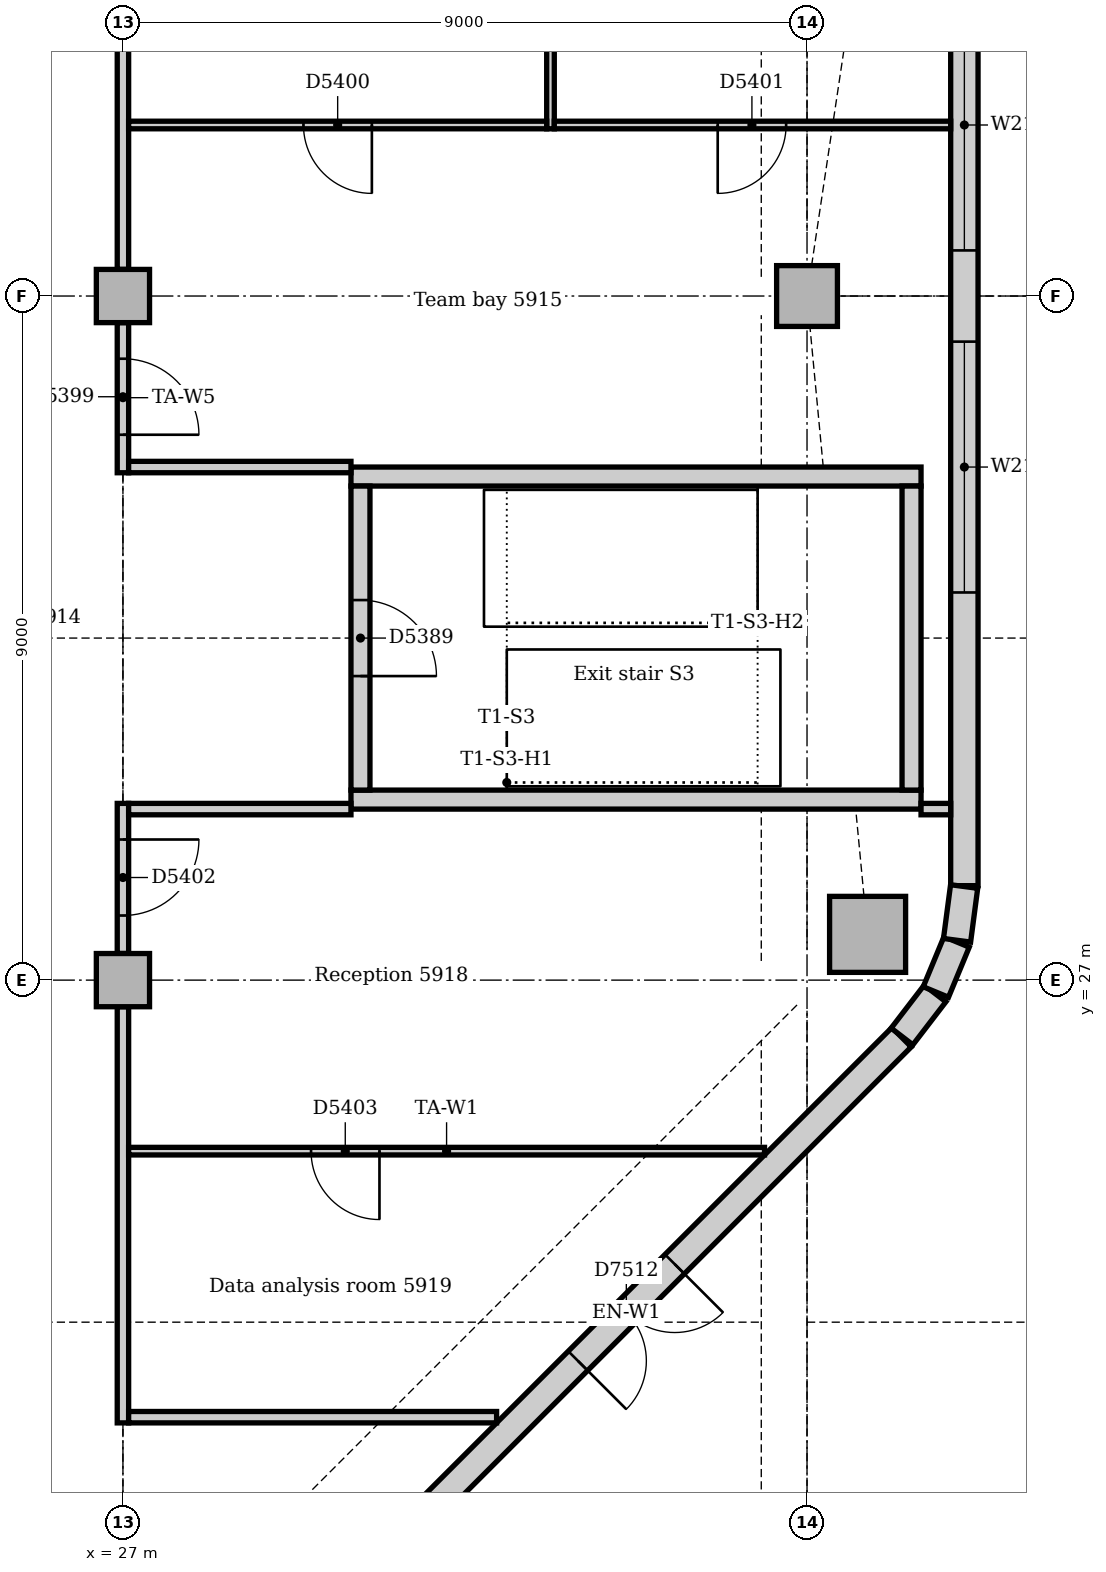
"""IFC4 building model, lengths in metres.
Left out: names, types, materials, properties, quantities, classifications, styles, units other than length and angle.
Written with IfcOpenShell. Run it as: python <this file> out.ifc"""

import sys

from ifc_helpers import new_model, si_unit, direction, frame, frame_2d, origin, origin_2d, place, context, subcontext, project, spatial, rectangle, extrude, element, fill, save


model = new_model("IFC4")
c1 = context("Model", 3, precision=1e-05, world=origin(), true_north=direction((0.0, 1.0)))
c2 = subcontext(c1, "Body", "Model", "MODEL_VIEW")
j1 = project(units=[si_unit("LENGTHUNIT", "METRE"), si_unit("PLANEANGLEUNIT", "RADIAN")], contexts=[c1])
p1 = place(None, origin())
s1 = spatial("IfcSite", under=j1, at=p1, CompositionType="ELEMENT")
p2 = place(p1, origin())
s2 = spatial("IfcBuilding", under=s1, at=p2, CompositionType="ELEMENT")
p3 = place(p2, frame((0.0, 0.0, 247.0)))
s3 = spatial("IfcBuildingStorey", under=s2, at=p3, CompositionType="ELEMENT", Elevation=247.0)
for number, where, z_axis, x_axis in (
    (1, (30.0, 29.375, 0.0), (0.0, 0.0, 1.0), (1.0, 0.0, 0.0)),
    (2, (37.5, 33.625, 0.0), (0.0, 0.0, 1.0), (-1.0, 0.0, 0.0)),
):
    element("IfcWall", number, at=place(p3, frame(where, z_axis=z_axis, x_axis=x_axis)), inside=s3, PredefinedType="SOLIDWALL", context=c2, shape_type="SweptSolid", body=[
        extrude(rectangle(XDim=7.5, YDim=0.25, at=frame_2d((3.75, 0.0))), origin(), (0.0, 0.0, 1.0), 4.0),
    ])
p4 = place(p3, frame((37.375, 29.5, 0.0), z_axis=(0.0, 0.0, 1.0), x_axis=(0.0, 1.0, 0.0)))
e3 = element("IfcWall", 3, at=p4, inside=s3, PredefinedType="SOLIDWALL", context=c2, shape_type="SweptSolid", body=[
    extrude(rectangle(XDim=4.0, YDim=0.25, at=frame_2d((2.0, 0.0))), origin(), (0.0, 0.0, 1.0), 4.0),
])
p5 = place(p3, frame((30.125, 33.5, 0.0), z_axis=(0.0, 0.0, 1.0), x_axis=(0.0, -1.0, 0.0)))
e4 = element("IfcWall", 4, at=p5, inside=s3, PredefinedType="SOLIDWALL", context=c2, shape_type="SweptSolid", body=[
    extrude(rectangle(XDim=4.0, YDim=0.25, at=frame_2d((2.0, 0.0))), origin(), (0.0, 0.0, 1.0), 4.0),
])
p6 = place(p5, frame((1.5, 0.0, 0.0)))
e5 = element("IfcOpeningElement", 5, at=p6, cuts=e4, PredefinedType="OPENING", context=c2, shape_type="SweptSolid", body=[
    extrude(rectangle(XDim=1.0, YDim=2.1, at=frame_2d((0.5, 1.05))), frame((0.0, 0.135, 0.0), z_axis=(0.0, -1.0, 0.0), x_axis=(1.0, 0.0, 0.0)), (0.0, 0.0, 1.0), 0.27),
])
p7 = place(p3, frame((36.797, 27.602, -0.15), z_axis=(0.0, 0.0, 1.0), x_axis=(1.0, 0.0, 0.0)))
e6 = element("IfcColumn", 6, at=p7, inside=s3, PredefinedType="COLUMN", context=c2, shape_type="SweptSolid", body=[
    extrude(rectangle(XDim=1.0, YDim=1.0, at=origin_2d()), origin(), (0.0, 0.0, 1.0), 4.0),
])
p8 = place(p3, frame((36.0, 36.0, -0.15), z_axis=(0.0, 0.0, 1.0), x_axis=(1.0, 0.0, 0.0)))
e7 = element("IfcColumn", 7, at=p8, inside=s3, PredefinedType="COLUMN", context=c2, shape_type="SweptSolid", body=[
    extrude(rectangle(XDim=0.8, YDim=0.8, at=origin_2d()), origin(), (0.0, 0.0, 1.0), 4.0),
])
for number, where, z_axis, x_axis in (
    (8, (27.0, 27.0, 0.0), (0.0, 0.0, 1.0), (1.0, 0.0, 0.0)),
    (9, (27.0, 36.0, 0.0), (0.0, 0.0, 1.0), (1.0, 0.0, 0.0)),
):
    element("IfcColumn", number, at=place(p3, frame(where, z_axis=z_axis, x_axis=x_axis)), inside=s3, PredefinedType="COLUMN", context=c2, shape_type="SweptSolid", body=[
        extrude(rectangle(XDim=0.7, YDim=0.7, at=origin_2d()), origin(), (0.0, 0.0, 1.0), 3.85),
    ])
p9 = place(p3, frame((30.001, 19.006, 0.0), z_axis=(0.0, 0.0, 1.0), x_axis=(0.707106781187, 0.707106781187, 0.0)))
e10 = element("IfcWall", 10, at=p9, inside=s3, PredefinedType="STANDARD", context=c2, shape_type="SweptSolid", body=[
    extrude(rectangle(XDim=10.243, YDim=0.36, at=frame_2d((5.121, 0.0))), origin(), (0.0, 0.0, 1.0), 3.85),
])
p10 = place(p9, frame((4.221, 0.0, 0.0)))
e11 = element("IfcOpeningElement", 11, at=p10, cuts=e10, PredefinedType="OPENING", context=c2, shape_type="SweptSolid", body=[
    extrude(rectangle(XDim=1.8, YDim=2.4, at=frame_2d((0.9, 1.2))), frame((0.0, 0.19, 0.0), z_axis=(0.0, -1.0, 0.0), x_axis=(1.0, 0.0, 0.0)), (0.0, 0.0, 1.0), 0.38),
])
p11 = place(p3, frame((38.07, 28.243, 0.0), z_axis=(0.0, 0.0, 1.0), x_axis=(0.0, 1.0, 0.0)))
e12 = element("IfcWall", 12, at=p11, inside=s3, PredefinedType="STANDARD", context=c2, shape_type="SweptSolid", body=[
    extrude(rectangle(XDim=24.515, YDim=0.36, at=frame_2d((12.257, 0.0))), origin(), (0.0, 0.0, 1.0), 3.85),
])
p12 = place(p11, frame((3.857, 0.0, 0.9)))
e13 = element("IfcOpeningElement", 13, at=p12, cuts=e12, PredefinedType="OPENING", context=c2, shape_type="SweptSolid", body=[
    extrude(rectangle(XDim=3.3, YDim=1.6, at=frame_2d((1.65, 0.8))), frame((0.0, 0.19, 0.0), z_axis=(0.0, -1.0, 0.0), x_axis=(1.0, 0.0, 0.0)), (0.0, 0.0, 1.0), 0.38),
])
p13 = place(p11, frame((8.357, 0.0, 0.9)))
e14 = element("IfcOpeningElement", 14, at=p13, cuts=e12, PredefinedType="OPENING", context=c2, shape_type="SweptSolid", body=[
    extrude(rectangle(XDim=3.3, YDim=1.6, at=frame_2d((1.65, 0.8))), frame((0.0, 0.19, 0.0), z_axis=(0.0, -1.0, 0.0), x_axis=(1.0, 0.0, 0.0)), (0.0, 0.0, 1.0), 0.38),
])
p14 = place(p11, frame((13.607, 0.0, 0.0)))
e15 = element("IfcOpeningElement", 15, at=p14, cuts=e12, PredefinedType="OPENING", context=c2, shape_type="SweptSolid", body=[
    extrude(rectangle(XDim=1.8, YDim=2.4, at=frame_2d((0.9, 1.2))), frame((0.0, 0.19, 0.0), z_axis=(0.0, -1.0, 0.0), x_axis=(1.0, 0.0, 0.0)), (0.0, 0.0, 1.0), 0.38),
])
p15 = place(p11, frame((17.357, 0.0, 0.9)))
e16 = element("IfcOpeningElement", 16, at=p15, cuts=e12, PredefinedType="OPENING", context=c2, shape_type="SweptSolid", body=[
    extrude(rectangle(XDim=3.3, YDim=1.6, at=frame_2d((1.65, 0.8))), frame((0.0, 0.19, 0.0), z_axis=(0.0, -1.0, 0.0), x_axis=(1.0, 0.0, 0.0)), (0.0, 0.0, 1.0), 0.38),
])
p16 = place(p3, frame((37.25, 26.259, 0.0), z_axis=(0.0, 0.0, 1.0), x_axis=(0.608802368033, 0.793321924995, 0.0)))
e17 = element("IfcWall", 17, at=p16, inside=s3, PredefinedType="STANDARD", context=c2, shape_type="SweptSolid", body=[
    extrude(rectangle(XDim=0.713, YDim=0.36, at=frame_2d((0.357, 0.0))), origin(), (0.0, 0.0, 1.0), 3.85),
])
for number, where, z_axis, x_axis in (
    (18, (37.695, 26.844, 0.0), (0.0, 0.0, 1.0), (0.383, 0.924, 0.0)),
    (19, (37.974, 27.524, 0.0), (0.0, 0.0, 1.0), (0.131, 0.991, 0.0)),
):
    element("IfcWall", number, at=place(p3, frame(where, z_axis=z_axis, x_axis=x_axis)), inside=s3, PredefinedType="STANDARD", context=c2, shape_type="SweptSolid", body=[
        extrude(rectangle(XDim=0.713, YDim=0.36, at=frame_2d((0.356, 0.0))), origin(), (0.0, 0.0, 1.0), 3.85),
    ])
p17 = place(p3, frame((27.0, 33.675, 0.0), z_axis=(0.0, 0.0, 1.0), x_axis=(0.0, 1.0, 0.0)))
e20 = element("IfcWall", 20, at=p17, inside=s3, PredefinedType="PARTITIONING", context=c2, shape_type="SweptSolid", body=[
    extrude(rectangle(XDim=1.975, YDim=0.15, at=frame_2d((0.988, 0.0))), origin(), (0.0, 0.0, 1.0), 3.4),
])
p18 = place(p17, frame((0.5, 0.0, 0.0)))
e21 = element("IfcOpeningElement", 21, at=p18, cuts=e20, PredefinedType="OPENING", context=c2, shape_type="SweptSolid", body=[
    extrude(rectangle(XDim=1.0, YDim=2.1, at=frame_2d((0.5, 1.05))), frame((0.0, 0.085, 0.0), z_axis=(0.0, -1.0, 0.0), x_axis=(1.0, 0.0, 0.0)), (0.0, 0.0, 1.0), 0.17),
])
p19 = place(p3, frame((27.0, 36.35, 0.0), z_axis=(0.0, 0.0, 1.0), x_axis=(0.0, 1.0, 0.0)))
e22 = element("IfcWall", 22, at=p19, inside=s3, PredefinedType="PARTITIONING", context=c2, shape_type="SweptSolid", body=[
    extrude(rectangle(XDim=7.4, YDim=0.15, at=frame_2d((3.7, 0.0))), origin(), (0.0, 0.0, 1.0), 3.4),
])
p20 = place(p3, frame((27.0, 21.175, 0.0), z_axis=(0.0, 0.0, 1.0), x_axis=(0.0, 1.0, 0.0)))
e23 = element("IfcWall", 23, at=p20, inside=s3, PredefinedType="PARTITIONING", context=c2, shape_type="SweptSolid", body=[
    extrude(rectangle(XDim=5.475, YDim=0.15, at=frame_2d((2.737, 0.0))), origin(), (0.0, 0.0, 1.0), 3.4),
])
p21 = place(p3, frame((27.0, 27.35, 0.0), z_axis=(0.0, 0.0, 1.0), x_axis=(0.0, 1.0, 0.0)))
e24 = element("IfcWall", 24, at=p21, inside=s3, PredefinedType="PARTITIONING", context=c2, shape_type="SweptSolid", body=[
    extrude(rectangle(XDim=1.975, YDim=0.15, at=frame_2d((0.988, 0.0))), origin(), (0.0, 0.0, 1.0), 3.4),
])
p22 = place(p21, frame((0.5, 0.0, 0.0)))
e25 = element("IfcOpeningElement", 25, at=p22, cuts=e24, PredefinedType="OPENING", context=c2, shape_type="SweptSolid", body=[
    extrude(rectangle(XDim=1.0, YDim=2.1, at=frame_2d((0.5, 1.05))), frame((0.0, 0.085, 0.0), z_axis=(0.0, -1.0, 0.0), x_axis=(1.0, 0.0, 0.0)), (0.0, 0.0, 1.0), 0.17),
])
p23 = place(p3, frame((27.075, 21.25, 0.0), z_axis=(0.0, 0.0, 1.0), x_axis=(1.0, 0.0, 0.0)))
e26 = element("IfcWall", 26, at=p23, inside=s3, PredefinedType="PARTITIONING", context=c2, shape_type="SweptSolid", body=[
    extrude(rectangle(XDim=4.841, YDim=0.15, at=frame_2d((2.421, 0.0))), origin(), (0.0, 0.0, 1.0), 3.85),
])
for number, where, z_axis, x_axis in (
    (27, (27.075, 29.25, 0.0), (0.0, 0.0, 1.0), (1.0, 0.0, 0.0)),
    (28, (27.075, 33.75, 0.0), (0.0, 0.0, 1.0), (1.0, 0.0, 0.0)),
):
    element("IfcWall", number, at=place(p3, frame(where, z_axis=z_axis, x_axis=x_axis)), inside=s3, PredefinedType="PARTITIONING", context=c2, shape_type="SweptSolid", body=[
        extrude(rectangle(XDim=2.925, YDim=0.15, at=frame_2d((1.462, 0.0))), origin(), (0.0, 0.0, 1.0), 3.85),
    ])
p24 = place(p3, frame((37.5, 29.25, 0.0), z_axis=(0.0, 0.0, 1.0), x_axis=(1.0, 0.0, 0.0)))
e29 = element("IfcWall", 29, at=p24, inside=s3, PredefinedType="PARTITIONING", context=c2, shape_type="SweptSolid", body=[
    extrude(rectangle(XDim=0.39, YDim=0.15, at=frame_2d((0.195, 0.0))), origin(), (0.0, 0.0, 1.0), 3.85),
])
p25 = place(p3, frame((32.625, 38.2, 0.0), z_axis=(0.0, 0.0, 1.0), x_axis=(0.0, 1.0, 0.0)))
e30 = element("IfcWall", 30, at=p25, inside=s3, PredefinedType="PARTITIONING", context=c2, shape_type="SweptSolid", body=[
    extrude(rectangle(XDim=20.966, YDim=0.1, at=frame_2d((10.483, 0.0))), origin(), (0.0, 0.0, 1.0), 3.85),
])
p26 = place(p3, frame((27.075, 38.25, 0.0), z_axis=(0.0, 0.0, 1.0), x_axis=(1.0, 0.0, 0.0)))
e31 = element("IfcWall", 31, at=p26, inside=s3, PredefinedType="PARTITIONING", context=c2, shape_type="SweptSolid", body=[
    extrude(rectangle(XDim=5.5, YDim=0.1, at=frame_2d((2.75, 0.0))), origin(), (0.0, 0.0, 1.0), 3.85),
])
p27 = place(p26, frame((2.3, 0.0, 0.0)))
e32 = element("IfcOpeningElement", 32, at=p27, cuts=e31, PredefinedType="OPENING", context=c2, shape_type="SweptSolid", body=[
    extrude(rectangle(XDim=0.9, YDim=2.1, at=frame_2d((0.45, 1.05))), frame((0.0, 0.06, 0.0), z_axis=(0.0, -1.0, 0.0), x_axis=(1.0, 0.0, 0.0)), (0.0, 0.0, 1.0), 0.12),
])
p28 = place(p3, frame((32.675, 38.25, 0.0), z_axis=(0.0, 0.0, 1.0), x_axis=(1.0, 0.0, 0.0)))
e33 = element("IfcWall", 33, at=p28, inside=s3, PredefinedType="PARTITIONING", context=c2, shape_type="SweptSolid", body=[
    extrude(rectangle(XDim=5.215, YDim=0.1, at=frame_2d((2.607, 0.0))), origin(), (0.0, 0.0, 1.0), 3.85),
])
p29 = place(p28, frame((2.15, 0.0, 0.0)))
e34 = element("IfcOpeningElement", 34, at=p29, cuts=e33, PredefinedType="OPENING", context=c2, shape_type="SweptSolid", body=[
    extrude(rectangle(XDim=0.9, YDim=2.1, at=frame_2d((0.45, 1.05))), frame((0.0, 0.06, 0.0), z_axis=(0.0, -1.0, 0.0), x_axis=(1.0, 0.0, 0.0)), (0.0, 0.0, 1.0), 0.12),
])
p30 = place(p3, frame((27.075, 24.75, 0.0), z_axis=(0.0, 0.0, 1.0), x_axis=(1.0, 0.0, 0.0)))
e35 = element("IfcWall", 35, at=p30, inside=s3, PredefinedType="PARTITIONING", context=c2, shape_type="SweptSolid", body=[
    extrude(rectangle(XDim=8.366, YDim=0.1, at=frame_2d((4.183, 0.0))), origin(), (0.0, 0.0, 1.0), 3.85),
])
p31 = place(p30, frame((2.4, 0.0, 0.0)))
e36 = element("IfcOpeningElement", 36, at=p31, cuts=e35, PredefinedType="OPENING", context=c2, shape_type="SweptSolid", body=[
    extrude(rectangle(XDim=0.9, YDim=2.1, at=frame_2d((0.45, 1.05))), frame((0.0, 0.06, 0.0), z_axis=(0.0, -1.0, 0.0), x_axis=(1.0, 0.0, 0.0)), (0.0, 0.0, 1.0), 0.12),
])
p32 = place(p10, frame((1.8, 0.0, 0.0), z_axis=(0.0, 0.0, 1.0), x_axis=(-1.0, 0.0, 0.0)))
e37 = element("IfcDoor", 37, at=p32, inside=s3, OperationType="DOUBLE_DOOR_SINGLE_SWING", PredefinedType="DOOR", context=c2, shape_type="SweptSolid", body=[
    extrude(rectangle(XDim=1.8, YDim=2.4, at=frame_2d((0.9, 1.2))), frame((0.0, -0.07, 0.0), z_axis=(0.0, -1.0, 0.0), x_axis=(1.0, 0.0, 0.0)), (0.0, 0.0, 1.0), 0.05),
])
fill(e11, e37)
p33 = place(p12, origin())
e38 = element("IfcWindow", 38, at=p33, inside=s3, PartitioningType="SINGLE_PANEL", PredefinedType="WINDOW", context=c2, shape_type="SweptSolid", body=[
    extrude(rectangle(XDim=3.3, YDim=1.6, at=frame_2d((1.65, 0.8))), frame((0.0, 0.13, 0.0), z_axis=(0.0, -1.0, 0.0), x_axis=(1.0, 0.0, 0.0)), (0.0, 0.0, 1.0), 0.06),
])
fill(e13, e38)
p34 = place(p13, origin())
e39 = element("IfcWindow", 39, at=p34, inside=s3, PartitioningType="SINGLE_PANEL", PredefinedType="WINDOW", context=c2, shape_type="SweptSolid", body=[
    extrude(rectangle(XDim=3.3, YDim=1.6, at=frame_2d((1.65, 0.8))), frame((0.0, 0.13, 0.0), z_axis=(0.0, -1.0, 0.0), x_axis=(1.0, 0.0, 0.0)), (0.0, 0.0, 1.0), 0.06),
])
fill(e14, e39)
p35 = place(p6, origin())
e40 = element("IfcDoor", 40, at=p35, inside=s3, OperationType="SINGLE_SWING_RIGHT", PredefinedType="DOOR", context=c2, shape_type="SweptSolid", body=[
    extrude(rectangle(XDim=1.0, YDim=2.1, at=frame_2d((0.5, 1.05))), frame((0.0, 0.025, 0.0), z_axis=(0.0, -1.0, 0.0), x_axis=(1.0, 0.0, 0.0)), (0.0, 0.0, 1.0), 0.05),
])
fill(e5, e40)
p36 = place(p18, frame((1.0, 0.0, 0.0), z_axis=(0.0, 0.0, 1.0), x_axis=(-1.0, 0.0, 0.0)))
e41 = element("IfcDoor", 41, at=p36, inside=s3, OperationType="SINGLE_SWING_RIGHT", PredefinedType="DOOR", context=c2, shape_type="SweptSolid", body=[
    extrude(rectangle(XDim=1.0, YDim=2.1, at=frame_2d((0.5, 1.05))), frame((0.0, 0.025, 0.0), z_axis=(0.0, -1.0, 0.0), x_axis=(1.0, 0.0, 0.0)), (0.0, 0.0, 1.0), 0.05),
])
fill(e21, e41)
p37 = place(p27, frame((0.9, 0.0, 0.0), z_axis=(0.0, 0.0, 1.0), x_axis=(-1.0, 0.0, 0.0)))
e42 = element("IfcDoor", 42, at=p37, inside=s3, OperationType="SINGLE_SWING_LEFT", PredefinedType="DOOR", context=c2, shape_type="SweptSolid", body=[
    extrude(rectangle(XDim=0.9, YDim=2.1, at=frame_2d((0.45, 1.05))), frame((0.0, 0.025, 0.0), z_axis=(0.0, -1.0, 0.0), x_axis=(1.0, 0.0, 0.0)), (0.0, 0.0, 1.0), 0.05),
])
fill(e32, e42)
p38 = place(p29, frame((0.9, 0.0, 0.0), z_axis=(0.0, 0.0, 1.0), x_axis=(-1.0, 0.0, 0.0)))
e43 = element("IfcDoor", 43, at=p38, inside=s3, OperationType="SINGLE_SWING_RIGHT", PredefinedType="DOOR", context=c2, shape_type="SweptSolid", body=[
    extrude(rectangle(XDim=0.9, YDim=2.1, at=frame_2d((0.45, 1.05))), frame((0.0, 0.025, 0.0), z_axis=(0.0, -1.0, 0.0), x_axis=(1.0, 0.0, 0.0)), (0.0, 0.0, 1.0), 0.05),
])
fill(e34, e43)
p39 = place(p22, frame((1.0, 0.0, 0.0), z_axis=(0.0, 0.0, 1.0), x_axis=(-1.0, 0.0, 0.0)))
e44 = element("IfcDoor", 44, at=p39, inside=s3, OperationType="SINGLE_SWING_LEFT", PredefinedType="DOOR", context=c2, shape_type="SweptSolid", body=[
    extrude(rectangle(XDim=1.0, YDim=2.1, at=frame_2d((0.5, 1.05))), frame((0.0, 0.025, 0.0), z_axis=(0.0, -1.0, 0.0), x_axis=(1.0, 0.0, 0.0)), (0.0, 0.0, 1.0), 0.05),
])
fill(e25, e44)
p40 = place(p31, frame((0.9, 0.0, 0.0), z_axis=(0.0, 0.0, 1.0), x_axis=(-1.0, 0.0, 0.0)))
e45 = element("IfcDoor", 45, at=p40, inside=s3, OperationType="SINGLE_SWING_LEFT", PredefinedType="DOOR", context=c2, shape_type="SweptSolid", body=[
    extrude(rectangle(XDim=0.9, YDim=2.1, at=frame_2d((0.45, 1.05))), frame((0.0, 0.025, 0.0), z_axis=(0.0, -1.0, 0.0), x_axis=(1.0, 0.0, 0.0)), (0.0, 0.0, 1.0), 0.05),
])
fill(e36, e45)
save(model, sys.argv[1])
